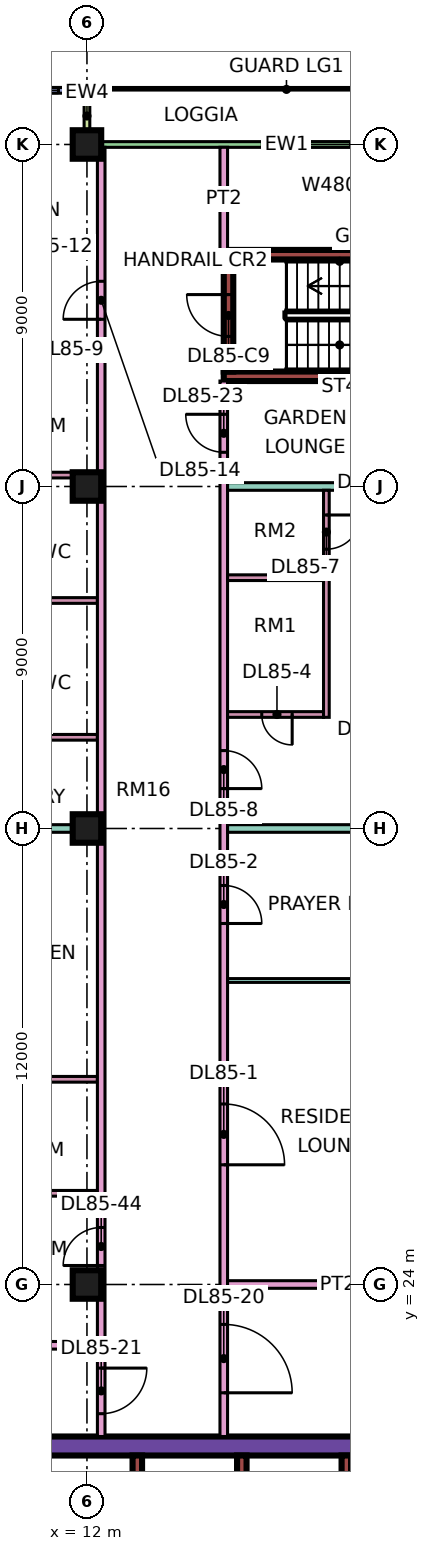
"""IFC4 building model, lengths in metres.
Left out: names, types, materials, properties, quantities, classifications, styles, units other than length and angle.
Written with IfcOpenShell. Run it as: python <this file> out.ifc"""

import sys

from ifc_helpers import new_model, si_unit, direction, frame, frame_2d, origin, origin_2d, place, context, subcontext, project, spatial, rectangle, extrude, element, fill, save


model = new_model("IFC4")
c1 = context("Model", 3, precision=1e-05, world=origin(), true_north=direction((0.0, 1.0)))
c2 = subcontext(c1, "Body", "Model", "MODEL_VIEW")
j1 = project(units=[si_unit("LENGTHUNIT", "METRE"), si_unit("PLANEANGLEUNIT", "RADIAN")], contexts=[c1])
p1 = place(None, origin())
s1 = spatial("IfcSite", under=j1, at=p1, CompositionType="ELEMENT")
p2 = place(p1, origin())
s2 = spatial("IfcBuilding", under=s1, at=p2, CompositionType="ELEMENT")
p3 = place(p2, frame((0.0, 0.0, 365.15)))
s3 = spatial("IfcBuildingStorey", under=s2, at=p3, CompositionType="ELEMENT", Elevation=365.15)
for number, where, z_axis, x_axis in (
    (1, (12.0, 24.0, 0.0), (0.0, 0.0, 1.0), (1.0, 0.0, 0.0)),
    (2, (12.0, 36.0, 0.0), (0.0, 0.0, 1.0), (1.0, 0.0, 0.0)),
    (3, (12.0, 45.0, 0.0), (0.0, 0.0, 1.0), (1.0, 0.0, 0.0)),
    (4, (12.0, 54.0, 0.0), (0.0, 0.0, 1.0), (1.0, 0.0, 0.0)),
):
    element("IfcColumn", number, at=place(p3, frame(where, z_axis=z_axis, x_axis=x_axis)), inside=s3, PredefinedType="COLUMN", context=c2, shape_type="SweptSolid", body=[
        extrude(rectangle(XDim=0.75, YDim=0.75, at=origin_2d()), origin(), (0.0, 0.0, 1.0), 3.75),
    ])
p4 = place(p3, frame((9.0, 19.75, 0.0), z_axis=(0.0, 0.0, 1.0), x_axis=(1.0, 0.0, 0.0)))
e5 = element("IfcWall", 5, at=p4, inside=s3, PredefinedType="SHEAR", context=c2, shape_type="SweptSolid", body=[
    extrude(rectangle(XDim=25.0, YDim=0.5, at=frame_2d((12.5, 0.0))), origin(), (0.0, 0.0, 1.0), 3.75),
])
p5 = place(p4, frame((19.1, 0.0, 0.0)))
e6 = element("IfcOpeningElement", 6, at=p5, cuts=e5, PredefinedType="OPENING", context=c2, shape_type="SweptSolid", body=[
    extrude(rectangle(XDim=1.8, YDim=2.4, at=frame_2d((0.9, 1.2))), frame((0.0, 0.26, 0.0), z_axis=(0.0, -1.0, 0.0), x_axis=(1.0, 0.0, 0.0)), (0.0, 0.0, 1.0), 0.52),
])
p6 = place(p3, frame((13.325, 7.5, 0.0), z_axis=(0.0, 0.0, 1.0), x_axis=(0.0, 1.0, 0.0)))
e7 = element("IfcWall", 7, at=p6, inside=s3, PredefinedType="SHEAR", context=c2, shape_type="SweptSolid", body=[
    extrude(rectangle(XDim=12.0, YDim=0.25, at=frame_2d((6.0, 0.0))), origin(), (0.0, 0.0, 1.0), 3.75),
])
for number, where, z_axis, x_axis in (
    (8, (16.075, 15.8, 0.0), (0.0, 0.0, 1.0), (0.0, 1.0, 0.0)),
    (9, (18.825, 15.8, 0.0), (0.0, 0.0, 1.0), (0.0, 1.0, 0.0)),
):
    element("IfcWall", number, at=place(p3, frame(where, z_axis=z_axis, x_axis=x_axis)), inside=s3, PredefinedType="SHEAR", context=c2, shape_type="SweptSolid", body=[
        extrude(rectangle(XDim=3.7, YDim=0.25, at=frame_2d((1.85, 0.0))), origin(), (0.0, 0.0, 1.0), 3.75),
    ])
for number, where, z_axis, x_axis in (
    (10, (15.6, 47.9, 0.0), (0.0, 0.0, 1.0), (1.0, 0.0, 0.0)),
    (11, (15.6, 51.1, 0.0), (0.0, 0.0, 1.0), (1.0, 0.0, 0.0)),
):
    element("IfcWall", number, at=place(p3, frame(where, z_axis=z_axis, x_axis=x_axis)), inside=s3, PredefinedType="SHEAR", context=c2, shape_type="SweptSolid", body=[
        extrude(rectangle(XDim=7.0, YDim=0.25, at=frame_2d((3.5, 0.0))), origin(), (0.0, 0.0, 1.0), 3.75),
    ])
p7 = place(p3, frame((15.725, 48.025, 0.0), z_axis=(0.0, 0.0, 1.0), x_axis=(0.0, 1.0, 0.0)))
e12 = element("IfcWall", 12, at=p7, inside=s3, PredefinedType="SHEAR", context=c2, shape_type="SweptSolid", body=[
    extrude(rectangle(XDim=2.95, YDim=0.25, at=frame_2d((1.475, 0.0))), origin(), (0.0, 0.0, 1.0), 3.75),
])
p8 = place(p7, frame((0.925, 0.0, 0.0)))
e13 = element("IfcOpeningElement", 13, at=p8, cuts=e12, PredefinedType="OPENING", context=c2, shape_type="SweptSolid", body=[
    extrude(rectangle(XDim=1.1, YDim=2.2, at=frame_2d((0.55, 1.1))), frame((0.0, 0.135, 0.0), z_axis=(0.0, -1.0, 0.0), x_axis=(1.0, 0.0, 0.0)), (0.0, 0.0, 1.0), 0.27),
])
p9 = place(p3, frame((22.425, 54.0, 0.0), z_axis=(0.0, 0.0, 1.0), x_axis=(-1.0, 0.0, 0.0)))
e14 = element("IfcWall", 14, at=p9, inside=s3, PredefinedType="SOLIDWALL", context=c2, shape_type="SweptSolid", body=[
    extrude(rectangle(XDim=10.35, YDim=0.15, at=frame_2d((5.175, 0.0))), origin(), (0.0, 0.0, 1.0), 3.35),
])
p10 = place(p9, frame((1.012, 0.0, 0.45)))
e15 = element("IfcOpeningElement", 15, at=p10, cuts=e14, PredefinedType="OPENING", context=c2, shape_type="SweptSolid", body=[
    extrude(rectangle(XDim=4.8, YDim=2.4, at=frame_2d((2.4, 1.2))), frame((0.0, 0.085, 0.0), z_axis=(0.0, -1.0, 0.0), x_axis=(1.0, 0.0, 0.0)), (0.0, 0.0, 1.0), 0.17),
])
p11 = place(p3, frame((12.0, 55.5, 0.0), z_axis=(0.0, 0.0, 1.0), x_axis=(0.0, -1.0, 0.0)))
e16 = element("IfcWall", 16, at=p11, inside=s3, PredefinedType="SOLIDWALL", context=c2, shape_type="SweptSolid", body=[
    extrude(rectangle(XDim=1.5, YDim=0.15, at=frame_2d((0.75, 0.0))), origin(), (0.0, 0.0, 1.0), 3.35),
])
p12 = place(p3, frame((11.925, 55.425, 0.0), z_axis=(0.0, 0.0, 1.0), x_axis=(-1.0, 0.0, 0.0)))
e17 = element("IfcWall", 17, at=p12, inside=s3, PredefinedType="SOLIDWALL", context=c2, shape_type="SweptSolid", body=[
    extrude(rectangle(XDim=10.425, YDim=0.15, at=frame_2d((5.212, 0.0))), origin(), (0.0, 0.0, 1.0), 3.35),
])
p13 = place(p12, frame((0.675, 0.0, 0.45)))
e18 = element("IfcOpeningElement", 18, at=p13, cuts=e17, PredefinedType="OPENING", context=c2, shape_type="SweptSolid", body=[
    extrude(rectangle(XDim=3.0, YDim=2.4, at=frame_2d((1.5, 1.2))), frame((0.0, 0.085, 0.0), z_axis=(0.0, -1.0, 0.0), x_axis=(1.0, 0.0, 0.0)), (0.0, 0.0, 1.0), 0.17),
])
p14 = place(p12, frame((6.488, 0.0, 0.45)))
e19 = element("IfcOpeningElement", 19, at=p14, cuts=e17, PredefinedType="OPENING", context=c2, shape_type="SweptSolid", body=[
    extrude(rectangle(XDim=3.0, YDim=2.4, at=frame_2d((1.5, 1.2))), frame((0.0, 0.085, 0.0), z_axis=(0.0, -1.0, 0.0), x_axis=(1.0, 0.0, 0.0)), (0.0, 0.0, 1.0), 0.17),
])
p15 = place(p3, frame((0.0, 36.0, 0.0), z_axis=(0.0, 0.0, 1.0), x_axis=(1.0, 0.0, 0.0)))
e20 = element("IfcWall", 20, at=p15, inside=s3, PredefinedType="PARTITIONING", context=c2, shape_type="SweptSolid", body=[
    extrude(rectangle(XDim=12.275, YDim=0.2, at=frame_2d((6.137, 0.0))), origin(), (0.0, 0.0, 1.0), 3.35),
])
p16 = place(p3, frame((0.074, 22.4, 0.0), z_axis=(0.0, 0.0, 1.0), x_axis=(1.0, 0.0, 0.0)))
e21 = element("IfcWall", 21, at=p16, inside=s3, PredefinedType="PARTITIONING", context=c2, shape_type="SweptSolid", body=[
    extrude(rectangle(XDim=12.201, YDim=0.2, at=frame_2d((6.101, 0.0))), origin(), (0.0, 0.0, 1.0), 3.35),
])
for number, where, z_axis, x_axis in (
    (22, (7.05, 26.4, 0.0), (0.0, 0.0, 1.0), (1.0, 0.0, 0.0)),
    (23, (7.05, 29.4, 0.0), (0.0, 0.0, 1.0), (1.0, 0.0, 0.0)),
):
    element("IfcWall", number, at=place(p3, frame(where, z_axis=z_axis, x_axis=x_axis)), inside=s3, PredefinedType="PARTITIONING", context=c2, shape_type="SweptSolid", body=[
        extrude(rectangle(XDim=5.225, YDim=0.15, at=frame_2d((2.612, 0.0))), origin(), (0.0, 0.0, 1.0), 3.35),
    ])
p17 = place(p3, frame((7.525, 51.3, 0.0), z_axis=(0.0, 0.0, 1.0), x_axis=(1.0, 0.0, 0.0)))
e24 = element("IfcWall", 24, at=p17, inside=s3, PredefinedType="PARTITIONING", context=c2, shape_type="SweptSolid", body=[
    extrude(rectangle(XDim=4.75, YDim=0.1, at=frame_2d((2.375, 0.0))), origin(), (0.0, 0.0, 1.0), 3.35),
])
p18 = place(p17, frame((2.0, 0.0, 0.0)))
e25 = element("IfcOpeningElement", 25, at=p18, cuts=e24, PredefinedType="OPENING", context=c2, shape_type="SweptSolid", body=[
    extrude(rectangle(XDim=0.9, YDim=2.1, at=frame_2d((0.45, 1.05))), frame((0.0, 0.06, 0.0), z_axis=(0.0, -1.0, 0.0), x_axis=(1.0, 0.0, 0.0)), (0.0, 0.0, 1.0), 0.12),
])
for number, where, z_axis, x_axis in (
    (26, (7.65, 38.4, 0.0), (0.0, 0.0, 1.0), (1.0, 0.0, 0.0)),
    (27, (7.65, 42.0, 0.0), (0.0, 0.0, 1.0), (1.0, 0.0, 0.0)),
    (28, (7.65, 45.3, 0.0), (0.0, 0.0, 1.0), (1.0, 0.0, 0.0)),
):
    element("IfcWall", number, at=place(p3, frame(where, z_axis=z_axis, x_axis=x_axis)), inside=s3, PredefinedType="PARTITIONING", context=c2, shape_type="SweptSolid", body=[
        extrude(rectangle(XDim=4.625, YDim=0.15, at=frame_2d((2.312, 0.0))), origin(), (0.0, 0.0, 1.0), 3.35),
    ])
p19 = place(p3, frame((7.65, 48.6, 0.0), z_axis=(0.0, 0.0, 1.0), x_axis=(1.0, 0.0, 0.0)))
e29 = element("IfcWall", 29, at=p19, inside=s3, PredefinedType="PARTITIONING", context=c2, shape_type="SweptSolid", body=[
    extrude(rectangle(XDim=4.625, YDim=0.15, at=frame_2d((2.312, 0.0))), origin(), (0.0, 0.0, 1.0), 3.35),
])
p20 = place(p19, frame((1.875, 0.0, 0.0)))
e30 = element("IfcOpeningElement", 30, at=p20, cuts=e29, PredefinedType="OPENING", context=c2, shape_type="SweptSolid", body=[
    extrude(rectangle(XDim=0.8, YDim=2.1, at=frame_2d((0.4, 1.05))), frame((0.0, 0.085, 0.0), z_axis=(0.0, -1.0, 0.0), x_axis=(1.0, 0.0, 0.0)), (0.0, 0.0, 1.0), 0.17),
])
p21 = place(p3, frame((12.375, 20.0, 0.0), z_axis=(0.0, 0.0, 1.0), x_axis=(0.0, 1.0, 0.0)))
e31 = element("IfcWall", 31, at=p21, inside=s3, PredefinedType="PARTITIONING", context=c2, shape_type="SweptSolid", body=[
    extrude(rectangle(XDim=33.926, YDim=0.2, at=frame_2d((16.963, 0.0))), origin(), (0.0, 0.0, 1.0), 3.35),
])
p22 = place(p21, frame((29.4, 0.0, 0.0)))
e32 = element("IfcOpeningElement", 32, at=p22, cuts=e31, PredefinedType="OPENING", context=c2, shape_type="SweptSolid", body=[
    extrude(rectangle(XDim=1.0, YDim=2.1, at=frame_2d((0.5, 1.05))), frame((0.0, 0.11, 0.0), z_axis=(0.0, -1.0, 0.0), x_axis=(1.0, 0.0, 0.0)), (0.0, 0.0, 1.0), 0.22),
])
p23 = place(p21, frame((0.6, 0.0, 0.0)))
e33 = element("IfcOpeningElement", 33, at=p23, cuts=e31, PredefinedType="OPENING", context=c2, shape_type="SweptSolid", body=[
    extrude(rectangle(XDim=1.2, YDim=2.1, at=frame_2d((0.6, 1.05))), frame((0.0, 0.11, 0.0), z_axis=(0.0, -1.0, 0.0), x_axis=(1.0, 0.0, 0.0)), (0.0, 0.0, 1.0), 0.22),
])
p24 = place(p21, frame((4.5, 0.0, 0.0)))
e34 = element("IfcOpeningElement", 34, at=p24, cuts=e31, PredefinedType="OPENING", context=c2, shape_type="SweptSolid", body=[
    extrude(rectangle(XDim=1.0, YDim=2.1, at=frame_2d((0.5, 1.05))), frame((0.0, 0.11, 0.0), z_axis=(0.0, -1.0, 0.0), x_axis=(1.0, 0.0, 0.0)), (0.0, 0.0, 1.0), 0.22),
])
p25 = place(p3, frame((15.6, 20.0, 0.0), z_axis=(0.0, 0.0, 1.0), x_axis=(0.0, 1.0, 0.0)))
e35 = element("IfcWall", 35, at=p25, inside=s3, PredefinedType="PARTITIONING", context=c2, shape_type="SweptSolid", body=[
    extrude(rectangle(XDim=27.775, YDim=0.2, at=frame_2d((13.887, 0.0))), origin(), (0.0, 0.0, 1.0), 3.35),
])
p26 = place(p25, frame((7.15, 0.0, 0.0)))
e36 = element("IfcOpeningElement", 36, at=p26, cuts=e35, PredefinedType="OPENING", context=c2, shape_type="SweptSolid", body=[
    extrude(rectangle(XDim=1.6, YDim=2.1, at=frame_2d((0.8, 1.05))), frame((0.0, 0.11, 0.0), z_axis=(0.0, -1.0, 0.0), x_axis=(1.0, 0.0, 0.0)), (0.0, 0.0, 1.0), 0.22),
])
p27 = place(p25, frame((13.5, 0.0, 0.0)))
e37 = element("IfcOpeningElement", 37, at=p27, cuts=e35, PredefinedType="OPENING", context=c2, shape_type="SweptSolid", body=[
    extrude(rectangle(XDim=1.0, YDim=2.1, at=frame_2d((0.5, 1.05))), frame((0.0, 0.11, 0.0), z_axis=(0.0, -1.0, 0.0), x_axis=(1.0, 0.0, 0.0)), (0.0, 0.0, 1.0), 0.22),
])
p28 = place(p25, frame((17.05, 0.0, 0.0)))
e38 = element("IfcOpeningElement", 38, at=p28, cuts=e35, PredefinedType="OPENING", context=c2, shape_type="SweptSolid", body=[
    extrude(rectangle(XDim=1.0, YDim=2.1, at=frame_2d((0.5, 1.05))), frame((0.0, 0.11, 0.0), z_axis=(0.0, -1.0, 0.0), x_axis=(1.0, 0.0, 0.0)), (0.0, 0.0, 1.0), 0.22),
])
p29 = place(p25, frame((1.15, 0.0, 0.0)))
e39 = element("IfcOpeningElement", 39, at=p29, cuts=e35, PredefinedType="OPENING", context=c2, shape_type="SweptSolid", body=[
    extrude(rectangle(XDim=1.8, YDim=2.1, at=frame_2d((0.9, 1.05))), frame((0.0, 0.11, 0.0), z_axis=(0.0, -1.0, 0.0), x_axis=(1.0, 0.0, 0.0)), (0.0, 0.0, 1.0), 0.22),
])
p30 = place(p25, frame((25.9, 0.0, 0.0)))
e40 = element("IfcOpeningElement", 40, at=p30, cuts=e35, PredefinedType="OPENING", context=c2, shape_type="SweptSolid", body=[
    extrude(rectangle(XDim=1.0, YDim=2.1, at=frame_2d((0.5, 1.05))), frame((0.0, 0.11, 0.0), z_axis=(0.0, -1.0, 0.0), x_axis=(1.0, 0.0, 0.0)), (0.0, 0.0, 1.0), 0.22),
])
p31 = place(p3, frame((15.6, 51.225, 0.0), z_axis=(0.0, 0.0, 1.0), x_axis=(0.0, 1.0, 0.0)))
e41 = element("IfcWall", 41, at=p31, inside=s3, PredefinedType="PARTITIONING", context=c2, shape_type="SweptSolid", body=[
    extrude(rectangle(XDim=2.701, YDim=0.2, at=frame_2d((1.351, 0.0))), origin(), (0.0, 0.0, 1.0), 3.35),
])
p32 = place(p3, frame((15.7, 24.0, 0.0), z_axis=(0.0, 0.0, 1.0), x_axis=(1.0, 0.0, 0.0)))
e42 = element("IfcWall", 42, at=p32, inside=s3, PredefinedType="PARTITIONING", context=c2, shape_type="SweptSolid", body=[
    extrude(rectangle(XDim=5.8, YDim=0.2, at=frame_2d((2.9, 0.0))), origin(), (0.0, 0.0, 1.0), 3.35),
])
p33 = place(p3, frame((15.7, 32.0, 0.0), z_axis=(0.0, 0.0, 1.0), x_axis=(1.0, 0.0, 0.0)))
e43 = element("IfcWall", 43, at=p33, inside=s3, PredefinedType="PARTITIONING", context=c2, shape_type="SweptSolid", body=[
    extrude(rectangle(XDim=5.8, YDim=0.1, at=frame_2d((2.9, 0.0))), origin(), (0.0, 0.0, 1.0), 3.35),
])
p34 = place(p3, frame((15.7, 36.0, 0.0), z_axis=(0.0, 0.0, 1.0), x_axis=(1.0, 0.0, 0.0)))
e44 = element("IfcWall", 44, at=p34, inside=s3, PredefinedType="PARTITIONING", context=c2, shape_type="SweptSolid", body=[
    extrude(rectangle(XDim=8.3, YDim=0.2, at=frame_2d((4.15, 0.0))), origin(), (0.0, 0.0, 1.0), 3.35),
])
p35 = place(p3, frame((15.7, 39.0, 0.0), z_axis=(0.0, 0.0, 1.0), x_axis=(1.0, 0.0, 0.0)))
e45 = element("IfcWall", 45, at=p35, inside=s3, PredefinedType="PARTITIONING", context=c2, shape_type="SweptSolid", body=[
    extrude(rectangle(XDim=2.525, YDim=0.15, at=frame_2d((1.263, 0.0))), origin(), (0.0, 0.0, 1.0), 3.35),
])
p36 = place(p35, frame((0.9, 0.0, 0.0)))
e46 = element("IfcOpeningElement", 46, at=p36, cuts=e45, PredefinedType="OPENING", context=c2, shape_type="SweptSolid", body=[
    extrude(rectangle(XDim=0.8, YDim=2.1, at=frame_2d((0.4, 1.05))), frame((0.0, 0.085, 0.0), z_axis=(0.0, -1.0, 0.0), x_axis=(1.0, 0.0, 0.0)), (0.0, 0.0, 1.0), 0.17),
])
p37 = place(p3, frame((15.7, 42.6, 0.0), z_axis=(0.0, 0.0, 1.0), x_axis=(1.0, 0.0, 0.0)))
e47 = element("IfcWall", 47, at=p37, inside=s3, PredefinedType="PARTITIONING", context=c2, shape_type="SweptSolid", body=[
    extrude(rectangle(XDim=2.525, YDim=0.15, at=frame_2d((1.263, 0.0))), origin(), (0.0, 0.0, 1.0), 3.35),
])
p38 = place(p3, frame((15.7, 45.0, 0.0), z_axis=(0.0, 0.0, 1.0), x_axis=(1.0, 0.0, 0.0)))
e48 = element("IfcWall", 48, at=p38, inside=s3, PredefinedType="PARTITIONING", context=c2, shape_type="SweptSolid", body=[
    extrude(rectangle(XDim=8.226, YDim=0.2, at=frame_2d((4.113, 0.0))), origin(), (0.0, 0.0, 1.0), 3.35),
])
p39 = place(p3, frame((18.3, 38.925, 0.0), z_axis=(0.0, 0.0, 1.0), x_axis=(0.0, 1.0, 0.0)))
e49 = element("IfcWall", 49, at=p39, inside=s3, PredefinedType="PARTITIONING", context=c2, shape_type="SweptSolid", body=[
    extrude(rectangle(XDim=5.975, YDim=0.15, at=frame_2d((2.987, 0.0))), origin(), (0.0, 0.0, 1.0), 3.35),
])
p40 = place(p39, frame((4.425, 0.0, 0.0)))
e50 = element("IfcOpeningElement", 50, at=p40, cuts=e49, PredefinedType="OPENING", context=c2, shape_type="SweptSolid", body=[
    extrude(rectangle(XDim=0.9, YDim=2.1, at=frame_2d((0.45, 1.05))), frame((0.0, 0.085, 0.0), z_axis=(0.0, -1.0, 0.0), x_axis=(1.0, 0.0, 0.0)), (0.0, 0.0, 1.0), 0.17),
])
p41 = place(p10, origin())
e51 = element("IfcWindow", 51, at=p41, inside=s3, PartitioningType="SINGLE_PANEL", PredefinedType="WINDOW", context=c2, shape_type="SweptSolid", body=[
    extrude(rectangle(XDim=4.8, YDim=2.4, at=frame_2d((2.4, 1.2))), frame((0.0, 0.03, 0.0), z_axis=(0.0, -1.0, 0.0), x_axis=(1.0, 0.0, 0.0)), (0.0, 0.0, 1.0), 0.06),
])
fill(e15, e51)
p42 = place(p13, origin())
e52 = element("IfcWindow", 52, at=p42, inside=s3, PartitioningType="SINGLE_PANEL", PredefinedType="WINDOW", context=c2, shape_type="SweptSolid", body=[
    extrude(rectangle(XDim=3.0, YDim=2.4, at=frame_2d((1.5, 1.2))), frame((0.0, 0.03, 0.0), z_axis=(0.0, -1.0, 0.0), x_axis=(1.0, 0.0, 0.0)), (0.0, 0.0, 1.0), 0.06),
])
fill(e18, e52)
p43 = place(p8, frame((1.1, 0.0, 0.0), z_axis=(0.0, 0.0, 1.0), x_axis=(-1.0, 0.0, 0.0)))
e53 = element("IfcDoor", 53, at=p43, inside=s3, OperationType="SINGLE_SWING_RIGHT", PredefinedType="DOOR", context=c2, shape_type="SweptSolid", body=[
    extrude(rectangle(XDim=1.1, YDim=2.2, at=frame_2d((0.55, 1.1))), frame((0.0, 0.025, 0.0), z_axis=(0.0, -1.0, 0.0), x_axis=(1.0, 0.0, 0.0)), (0.0, 0.0, 1.0), 0.05),
])
fill(e13, e53)
p44 = place(p26, frame((1.6, 0.0, 0.0), z_axis=(0.0, 0.0, 1.0), x_axis=(-1.0, 0.0, 0.0)))
e54 = element("IfcDoor", 54, at=p44, inside=s3, OperationType="DOUBLE_DOOR_SINGLE_SWING", PredefinedType="DOOR", context=c2, shape_type="SweptSolid", body=[
    extrude(rectangle(XDim=1.6, YDim=2.1, at=frame_2d((0.8, 1.05))), frame((0.0, 0.025, 0.0), z_axis=(0.0, -1.0, 0.0), x_axis=(1.0, 0.0, 0.0)), (0.0, 0.0, 1.0), 0.05),
])
fill(e36, e54)
p45 = place(p27, frame((1.0, 0.0, 0.0), z_axis=(0.0, 0.0, 1.0), x_axis=(-1.0, 0.0, 0.0)))
e55 = element("IfcDoor", 55, at=p45, inside=s3, OperationType="SINGLE_SWING_LEFT", PredefinedType="DOOR", context=c2, shape_type="SweptSolid", body=[
    extrude(rectangle(XDim=1.0, YDim=2.1, at=frame_2d((0.5, 1.05))), frame((0.0, 0.025, 0.0), z_axis=(0.0, -1.0, 0.0), x_axis=(1.0, 0.0, 0.0)), (0.0, 0.0, 1.0), 0.05),
])
fill(e37, e55)
p46 = place(p36, origin())
e56 = element("IfcDoor", 56, at=p46, inside=s3, OperationType="SINGLE_SWING_RIGHT", PredefinedType="DOOR", context=c2, shape_type="SweptSolid", body=[
    extrude(rectangle(XDim=0.8, YDim=2.1, at=frame_2d((0.4, 1.05))), frame((0.0, 0.025, 0.0), z_axis=(0.0, -1.0, 0.0), x_axis=(1.0, 0.0, 0.0)), (0.0, 0.0, 1.0), 0.05),
])
fill(e46, e56)
p47 = place(p40, origin())
e57 = element("IfcDoor", 57, at=p47, inside=s3, OperationType="SINGLE_SWING_RIGHT", PredefinedType="DOOR", context=c2, shape_type="SweptSolid", body=[
    extrude(rectangle(XDim=0.9, YDim=2.1, at=frame_2d((0.45, 1.05))), frame((0.0, 0.025, 0.0), z_axis=(0.0, -1.0, 0.0), x_axis=(1.0, 0.0, 0.0)), (0.0, 0.0, 1.0), 0.05),
])
fill(e50, e57)
p48 = place(p28, frame((1.0, 0.0, 0.0), z_axis=(0.0, 0.0, 1.0), x_axis=(-1.0, 0.0, 0.0)))
e58 = element("IfcDoor", 58, at=p48, inside=s3, OperationType="SINGLE_SWING_LEFT", PredefinedType="DOOR", context=c2, shape_type="SweptSolid", body=[
    extrude(rectangle(XDim=1.0, YDim=2.1, at=frame_2d((0.5, 1.05))), frame((0.0, 0.025, 0.0), z_axis=(0.0, -1.0, 0.0), x_axis=(1.0, 0.0, 0.0)), (0.0, 0.0, 1.0), 0.05),
])
fill(e38, e58)
p49 = place(p22, origin())
e59 = element("IfcDoor", 59, at=p49, inside=s3, OperationType="SINGLE_SWING_LEFT", PredefinedType="DOOR", context=c2, shape_type="SweptSolid", body=[
    extrude(rectangle(XDim=1.0, YDim=2.1, at=frame_2d((0.5, 1.05))), frame((0.0, 0.025, 0.0), z_axis=(0.0, -1.0, 0.0), x_axis=(1.0, 0.0, 0.0)), (0.0, 0.0, 1.0), 0.05),
])
fill(e32, e59)
p50 = place(p29, frame((1.8, 0.0, 0.0), z_axis=(0.0, 0.0, 1.0), x_axis=(-1.0, 0.0, 0.0)))
e60 = element("IfcDoor", 60, at=p50, inside=s3, OperationType="DOUBLE_DOOR_SINGLE_SWING", PredefinedType="DOOR", context=c2, shape_type="SweptSolid", body=[
    extrude(rectangle(XDim=1.8, YDim=2.1, at=frame_2d((0.9, 1.05))), frame((0.0, 0.025, 0.0), z_axis=(0.0, -1.0, 0.0), x_axis=(1.0, 0.0, 0.0)), (0.0, 0.0, 1.0), 0.05),
])
fill(e39, e60)
p51 = place(p23, origin())
e61 = element("IfcDoor", 61, at=p51, inside=s3, OperationType="SINGLE_SWING_RIGHT", PredefinedType="DOOR", context=c2, shape_type="SweptSolid", body=[
    extrude(rectangle(XDim=1.2, YDim=2.1, at=frame_2d((0.6, 1.05))), frame((0.0, 0.025, 0.0), z_axis=(0.0, -1.0, 0.0), x_axis=(1.0, 0.0, 0.0)), (0.0, 0.0, 1.0), 0.05),
])
fill(e33, e61)
p52 = place(p30, frame((1.0, 0.0, 0.0), z_axis=(0.0, 0.0, 1.0), x_axis=(-1.0, 0.0, 0.0)))
e62 = element("IfcDoor", 62, at=p52, inside=s3, OperationType="SINGLE_SWING_RIGHT", PredefinedType="DOOR", context=c2, shape_type="SweptSolid", body=[
    extrude(rectangle(XDim=1.0, YDim=2.1, at=frame_2d((0.5, 1.05))), frame((0.0, 0.025, 0.0), z_axis=(0.0, -1.0, 0.0), x_axis=(1.0, 0.0, 0.0)), (0.0, 0.0, 1.0), 0.05),
])
fill(e40, e62)
p53 = place(p24, origin())
e63 = element("IfcDoor", 63, at=p53, inside=s3, OperationType="SINGLE_SWING_LEFT", PredefinedType="DOOR", context=c2, shape_type="SweptSolid", body=[
    extrude(rectangle(XDim=1.0, YDim=2.1, at=frame_2d((0.5, 1.05))), frame((0.0, 0.025, 0.0), z_axis=(0.0, -1.0, 0.0), x_axis=(1.0, 0.0, 0.0)), (0.0, 0.0, 1.0), 0.05),
])
fill(e34, e63)
save(model, sys.argv[1])
